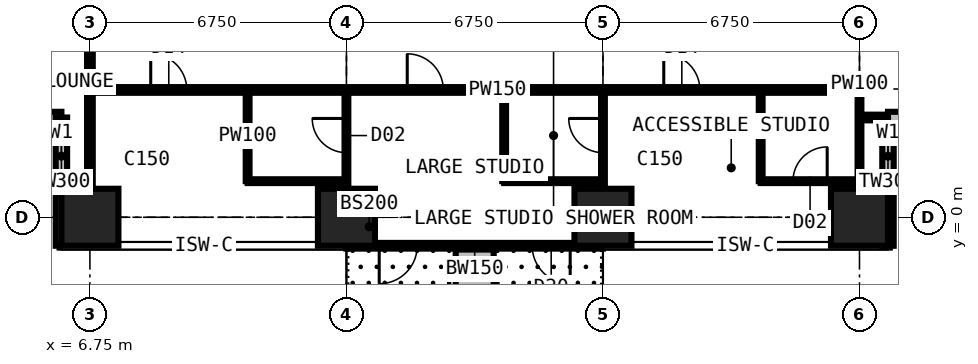
"""IFC4 building model, lengths in metres.
Left out: names, types, materials, properties, quantities, classifications, styles, units other than length and angle.
Written with IfcOpenShell. Run it as: python <this file> out.ifc"""

import sys

from ifc_helpers import new_model, si_unit, direction, frame, frame_2d, origin, origin_2d, place, context, subcontext, project, spatial, rectangle, extrude, element, fill, save


model = new_model("IFC4")
c1 = context("Model", 3, precision=1e-05, world=origin(), true_north=direction((0.0, 1.0)))
c2 = subcontext(c1, "Body", "Model", "MODEL_VIEW")
j1 = project(units=[si_unit("LENGTHUNIT", "METRE"), si_unit("PLANEANGLEUNIT", "RADIAN")], contexts=[c1])
p1 = place(None, origin())
s1 = spatial("IfcSite", under=j1, at=p1, CompositionType="ELEMENT")
p2 = place(p1, origin())
s2 = spatial("IfcBuilding", under=s1, at=p2, CompositionType="ELEMENT")
p3 = place(p2, frame((0.0, 0.0, 156.6)))
s3 = spatial("IfcBuildingStorey", under=s2, at=p3, CompositionType="ELEMENT", Elevation=156.6)
for number, where, z_axis, x_axis in (
    (1, (6.75, 0.0, 0.0), (0.0, 0.0, 1.0), (1.0, 0.0, 0.0)),
    (2, (13.5, 0.0, 0.0), (0.0, 0.0, 1.0), (1.0, 0.0, 0.0)),
    (3, (20.25, 0.0, 0.0), (0.0, 0.0, 1.0), (1.0, 0.0, 0.0)),
    (4, (27.0, 0.0, 0.0), (0.0, 0.0, 1.0), (1.0, 0.0, 0.0)),
):
    element("IfcColumn", number, at=place(p3, frame(where, z_axis=z_axis, x_axis=x_axis)), inside=s3, PredefinedType="COLUMN", context=c2, shape_type="SweptSolid", body=[
        extrude(rectangle(XDim=1.5, YDim=1.5, at=origin_2d()), origin(), (0.0, 0.0, 1.0), 3.6),
    ])
p4 = place(p3, frame((2.625, 2.625, 0.0), z_axis=(0.0, 0.0, 1.0), x_axis=(1.0, 0.0, 0.0)))
e5 = element("IfcWall", 5, at=p4, inside=s3, PredefinedType="SOLIDWALL", context=c2, shape_type="SweptSolid", body=[
    extrude(rectangle(XDim=3.375, YDim=0.3, at=frame_2d((1.688, 0.0))), origin(), (0.0, 0.0, 1.0), 3.375),
])
p5 = place(p4, frame((0.788, 0.0, 0.6)))
e6 = element("IfcOpeningElement", 6, at=p5, cuts=e5, PredefinedType="OPENING", context=c2, shape_type="SweptSolid", body=[
    extrude(rectangle(XDim=1.8, YDim=2.1, at=frame_2d((0.9, 1.05))), frame((0.0, 0.16, 0.0), z_axis=(0.0, -1.0, 0.0), x_axis=(1.0, 0.0, 0.0)), (0.0, 0.0, 1.0), 0.32),
])
p6 = place(p3, frame((6.0, 2.625, 0.0), z_axis=(0.0, 0.0, 1.0), x_axis=(0.0, -1.0, 0.0)))
e7 = element("IfcWall", 7, at=p6, inside=s3, PredefinedType="SOLIDWALL", context=c2, shape_type="SweptSolid", body=[
    extrude(rectangle(XDim=3.375, YDim=0.3, at=frame_2d((1.688, 0.0))), origin(), (0.0, 0.0, 1.0), 3.375),
])
p7 = place(p6, frame((0.268, 0.0, 0.9)))
e8 = element("IfcOpeningElement", 8, at=p7, cuts=e7, PredefinedType="OPENING", context=c2, shape_type="SweptSolid", body=[
    extrude(rectangle(XDim=1.5, YDim=1.8, at=frame_2d((0.75, 0.9))), frame((0.0, 0.16, 0.0), z_axis=(0.0, -1.0, 0.0), x_axis=(1.0, 0.0, 0.0)), (0.0, 0.0, 1.0), 0.32),
])
p8 = place(p3, frame((20.25, -0.75, 0.0), z_axis=(0.0, 0.0, 1.0), x_axis=(-1.0, 0.0, 0.0)))
e9 = element("IfcWall", 9, at=p8, inside=s3, PredefinedType="SOLIDWALL", context=c2, shape_type="SweptSolid", body=[
    extrude(rectangle(XDim=6.75, YDim=0.15, at=frame_2d((3.375, 0.0))), origin(), (0.0, 0.0, 1.0), 3.375),
])
p9 = place(p8, frame((0.863, 0.0, 0.0)))
e10 = element("IfcOpeningElement", 10, at=p9, cuts=e9, PredefinedType="OPENING", context=c2, shape_type="SweptSolid", body=[
    extrude(rectangle(XDim=1.0, YDim=2.2, at=frame_2d((0.5, 1.1))), frame((0.0, 0.085, 0.0), z_axis=(0.0, -1.0, 0.0), x_axis=(1.0, 0.0, 0.0)), (0.0, 0.0, 1.0), 0.17),
])
p10 = place(p8, frame((1.975, 0.0, 0.9)))
e11 = element("IfcOpeningElement", 11, at=p10, cuts=e9, PredefinedType="OPENING", context=c2, shape_type="SweptSolid", body=[
    extrude(rectangle(XDim=1.2, YDim=1.8, at=frame_2d((0.6, 0.9))), frame((0.0, 0.085, 0.0), z_axis=(0.0, -1.0, 0.0), x_axis=(1.0, 0.0, 0.0)), (0.0, 0.0, 1.0), 0.17),
])
p11 = place(p8, frame((4.887, 0.0, 0.0)))
e12 = element("IfcOpeningElement", 12, at=p11, cuts=e9, PredefinedType="OPENING", context=c2, shape_type="SweptSolid", body=[
    extrude(rectangle(XDim=1.0, YDim=2.2, at=frame_2d((0.5, 1.1))), frame((0.0, 0.085, 0.0), z_axis=(0.0, -1.0, 0.0), x_axis=(1.0, 0.0, 0.0)), (0.0, 0.0, 1.0), 0.17),
])
p12 = place(p8, frame((3.575, 0.0, 0.9)))
e13 = element("IfcOpeningElement", 13, at=p12, cuts=e9, PredefinedType="OPENING", context=c2, shape_type="SweptSolid", body=[
    extrude(rectangle(XDim=1.2, YDim=1.8, at=frame_2d((0.6, 0.9))), frame((0.0, 0.085, 0.0), z_axis=(0.0, -1.0, 0.0), x_axis=(1.0, 0.0, 0.0)), (0.0, 0.0, 1.0), 0.17),
])
p13 = place(p3, frame((27.75, -0.75, 0.0), z_axis=(0.0, 0.0, 1.0), x_axis=(0.0, 1.0, 0.0)))
e14 = element("IfcWall", 14, at=p13, inside=s3, PredefinedType="SOLIDWALL", context=c2, shape_type="SweptSolid", body=[
    extrude(rectangle(XDim=3.375, YDim=0.3, at=frame_2d((1.688, 0.0))), origin(), (0.0, 0.0, 1.0), 3.375),
])
p14 = place(p13, frame((1.607, 0.0, 0.9)))
e15 = element("IfcOpeningElement", 15, at=p14, cuts=e14, PredefinedType="OPENING", context=c2, shape_type="SweptSolid", body=[
    extrude(rectangle(XDim=1.5, YDim=1.8, at=frame_2d((0.75, 0.9))), frame((0.0, 0.16, 0.0), z_axis=(0.0, -1.0, 0.0), x_axis=(1.0, 0.0, 0.0)), (0.0, 0.0, 1.0), 0.32),
])
p15 = place(p3, frame((27.75, 2.625, 0.0), z_axis=(0.0, 0.0, 1.0), x_axis=(1.0, 0.0, 0.0)))
e16 = element("IfcWall", 16, at=p15, inside=s3, PredefinedType="SOLIDWALL", context=c2, shape_type="SweptSolid", body=[
    extrude(rectangle(XDim=3.375, YDim=0.3, at=frame_2d((1.688, 0.0))), origin(), (0.0, 0.0, 1.0), 3.375),
])
p16 = place(p15, frame((0.788, 0.0, 0.6)))
e17 = element("IfcOpeningElement", 17, at=p16, cuts=e16, PredefinedType="OPENING", context=c2, shape_type="SweptSolid", body=[
    extrude(rectangle(XDim=1.8, YDim=2.1, at=frame_2d((0.9, 1.05))), frame((0.0, 0.16, 0.0), z_axis=(0.0, -1.0, 0.0), x_axis=(1.0, 0.0, 0.0)), (0.0, 0.0, 1.0), 0.32),
])
p17 = place(p3, frame((16.875, -0.85, 0.0), z_axis=(0.0, 0.0, 1.0), x_axis=(0.0, -1.0, 0.0)))
e18 = element("IfcWall", 18, at=p17, inside=s3, PredefinedType="USERDEFINED", context=c2, shape_type="SweptSolid", body=[
    extrude(rectangle(XDim=2.2, YDim=1.0, at=frame_2d((1.1, 0.0))), origin(), (0.0, 0.0, 1.0), 0.9),
])
p18 = place(p3, frame((6.75, -0.734, 0.0), z_axis=(0.0, 0.0, 1.0), x_axis=(0.0, 1.0, 0.0)))
e19 = element("IfcWall", 19, at=p18, inside=s3, PredefinedType="PARTITIONING", context=c2, shape_type="SweptSolid", body=[
    extrude(rectangle(XDim=10.859, YDim=0.15, at=frame_2d((5.429, 0.0))), origin(), (0.0, 0.0, 1.0), 2.877),
])
p19 = place(p18, frame((5.684, 0.0, 0.0)))
e20 = element("IfcOpeningElement", 20, at=p19, cuts=e19, PredefinedType="OPENING", context=c2, shape_type="SweptSolid", body=[
    extrude(rectangle(XDim=1.0, YDim=2.2, at=frame_2d((0.5, 1.1))), frame((0.0, 0.085, 0.0), z_axis=(0.0, -1.0, 0.0), x_axis=(1.0, 0.0, 0.0)), (0.0, 0.0, 1.0), 0.17),
])
p20 = place(p3, frame((6.75, 3.35, 0.0), z_axis=(0.0, 0.0, 1.0), x_axis=(1.0, 0.0, 0.0)))
e21 = element("IfcWall", 21, at=p20, inside=s3, PredefinedType="PARTITIONING", context=c2, shape_type="SweptSolid", body=[
    extrude(rectangle(XDim=20.25, YDim=0.15, at=frame_2d((10.125, 0.0))), origin(), (0.0, 0.0, 1.0), 3.375),
])
p21 = place(p20, frame((15.1, 0.0, 0.0)))
e22 = element("IfcOpeningElement", 22, at=p21, cuts=e21, PredefinedType="OPENING", context=c2, shape_type="SweptSolid", body=[
    extrude(rectangle(XDim=0.95, YDim=2.2, at=frame_2d((0.475, 1.1))), frame((0.0, 0.085, 0.0), z_axis=(0.0, -1.0, 0.0), x_axis=(1.0, 0.0, 0.0)), (0.0, 0.0, 1.0), 0.17),
])
p22 = place(p20, frame((8.35, 0.0, 0.0)))
e23 = element("IfcOpeningElement", 23, at=p22, cuts=e21, PredefinedType="OPENING", context=c2, shape_type="SweptSolid", body=[
    extrude(rectangle(XDim=0.95, YDim=2.2, at=frame_2d((0.475, 1.1))), frame((0.0, 0.085, 0.0), z_axis=(0.0, -1.0, 0.0), x_axis=(1.0, 0.0, 0.0)), (0.0, 0.0, 1.0), 0.17),
])
p23 = place(p20, frame((1.6, 0.0, 0.0)))
e24 = element("IfcOpeningElement", 24, at=p23, cuts=e21, PredefinedType="OPENING", context=c2, shape_type="SweptSolid", body=[
    extrude(rectangle(XDim=0.95, YDim=2.2, at=frame_2d((0.475, 1.1))), frame((0.0, 0.085, 0.0), z_axis=(0.0, -1.0, 0.0), x_axis=(1.0, 0.0, 0.0)), (0.0, 0.0, 1.0), 0.17),
])
p24 = place(p3, frame((10.9, 0.95, 0.0), z_axis=(0.0, 0.0, 1.0), x_axis=(0.0, 1.0, 0.0)))
e25 = element("IfcWall", 25, at=p24, inside=s3, PredefinedType="PARTITIONING", context=c2, shape_type="SweptSolid", body=[
    extrude(rectangle(XDim=2.4, YDim=0.1, at=frame_2d((1.2, 0.0))), origin(), (0.0, 0.0, 1.0), 3.375),
])
p25 = place(p3, frame((10.9, 0.95, 0.0), z_axis=(0.0, 0.0, 1.0), x_axis=(1.0, 0.0, 0.0)))
e26 = element("IfcWall", 26, at=p25, inside=s3, PredefinedType="PARTITIONING", context=c2, shape_type="SweptSolid", body=[
    extrude(rectangle(XDim=2.6, YDim=0.1, at=frame_2d((1.3, 0.0))), origin(), (0.0, 0.0, 1.0), 3.375),
])
p26 = place(p3, frame((13.5, -0.734, 0.0), z_axis=(0.0, 0.0, 1.0), x_axis=(0.0, 1.0, 0.0)))
e27 = element("IfcWall", 27, at=p26, inside=s3, PredefinedType="PARTITIONING", context=c2, shape_type="SweptSolid", body=[
    extrude(rectangle(XDim=4.084, YDim=0.1, at=frame_2d((2.042, 0.0))), origin(), (0.0, 0.0, 1.0), 2.877),
])
p27 = place(p26, frame((2.434, 0.0, 0.0)))
e28 = element("IfcOpeningElement", 28, at=p27, cuts=e27, PredefinedType="OPENING", context=c2, shape_type="SweptSolid", body=[
    extrude(rectangle(XDim=0.9, YDim=2.2, at=frame_2d((0.45, 1.1))), frame((0.0, 0.06, 0.0), z_axis=(0.0, -1.0, 0.0), x_axis=(1.0, 0.0, 0.0)), (0.0, 0.0, 1.0), 0.12),
])
p28 = place(p3, frame((17.65, 0.95, 0.0), z_axis=(0.0, 0.0, 1.0), x_axis=(0.0, 1.0, 0.0)))
e29 = element("IfcWall", 29, at=p28, inside=s3, PredefinedType="PARTITIONING", context=c2, shape_type="SweptSolid", body=[
    extrude(rectangle(XDim=2.4, YDim=0.1, at=frame_2d((1.2, 0.0))), origin(), (0.0, 0.0, 1.0), 3.375),
])
p29 = place(p3, frame((17.65, 0.95, 0.0), z_axis=(0.0, 0.0, 1.0), x_axis=(1.0, 0.0, 0.0)))
e30 = element("IfcWall", 30, at=p29, inside=s3, PredefinedType="PARTITIONING", context=c2, shape_type="SweptSolid", body=[
    extrude(rectangle(XDim=2.6, YDim=0.1, at=frame_2d((1.3, 0.0))), origin(), (0.0, 0.0, 1.0), 3.375),
])
p30 = place(p3, frame((20.25, -0.734, 0.0), z_axis=(0.0, 0.0, 1.0), x_axis=(0.0, 1.0, 0.0)))
e31 = element("IfcWall", 31, at=p30, inside=s3, PredefinedType="PARTITIONING", context=c2, shape_type="SweptSolid", body=[
    extrude(rectangle(XDim=4.084, YDim=0.1, at=frame_2d((2.042, 0.0))), origin(), (0.0, 0.0, 1.0), 2.877),
])
p31 = place(p30, frame((2.434, 0.0, 0.0)))
e32 = element("IfcOpeningElement", 32, at=p31, cuts=e31, PredefinedType="OPENING", context=c2, shape_type="SweptSolid", body=[
    extrude(rectangle(XDim=0.9, YDim=2.2, at=frame_2d((0.45, 1.1))), frame((0.0, 0.06, 0.0), z_axis=(0.0, -1.0, 0.0), x_axis=(1.0, 0.0, 0.0)), (0.0, 0.0, 1.0), 0.12),
])
p32 = place(p3, frame((24.4, 0.95, 0.0), z_axis=(0.0, 0.0, 1.0), x_axis=(0.0, 1.0, 0.0)))
e33 = element("IfcWall", 33, at=p32, inside=s3, PredefinedType="PARTITIONING", context=c2, shape_type="SweptSolid", body=[
    extrude(rectangle(XDim=2.4, YDim=0.1, at=frame_2d((1.2, 0.0))), origin(), (0.0, 0.0, 1.0), 3.375),
])
p33 = place(p3, frame((24.4, 0.95, 0.0), z_axis=(0.0, 0.0, 1.0), x_axis=(1.0, 0.0, 0.0)))
e34 = element("IfcWall", 34, at=p33, inside=s3, PredefinedType="PARTITIONING", context=c2, shape_type="SweptSolid", body=[
    extrude(rectangle(XDim=2.6, YDim=0.1, at=frame_2d((1.3, 0.0))), origin(), (0.0, 0.0, 1.0), 3.375),
])
p34 = place(p33, frame((0.85, 0.0, 0.0)))
e35 = element("IfcOpeningElement", 35, at=p34, cuts=e34, PredefinedType="OPENING", context=c2, shape_type="SweptSolid", body=[
    extrude(rectangle(XDim=0.9, YDim=2.2, at=frame_2d((0.45, 1.1))), frame((0.0, 0.06, 0.0), z_axis=(0.0, -1.0, 0.0), x_axis=(1.0, 0.0, 0.0)), (0.0, 0.0, 1.0), 0.12),
])
p35 = place(p3, frame((27.0, -0.734, 0.0), z_axis=(0.0, 0.0, 1.0), x_axis=(0.0, 1.0, 0.0)))
e36 = element("IfcWall", 36, at=p35, inside=s3, PredefinedType="PARTITIONING", context=c2, shape_type="SweptSolid", body=[
    extrude(rectangle(XDim=4.084, YDim=0.1, at=frame_2d((2.042, 0.0))), origin(), (0.0, 0.0, 1.0), 2.877),
])
p36 = place(p3, frame((27.0, 2.625, 0.0), z_axis=(0.0, 0.0, 1.0), x_axis=(1.0, 0.0, 0.0)))
e37 = element("IfcWall", 37, at=p36, inside=s3, PredefinedType="PARTITIONING", context=c2, shape_type="SweptSolid", body=[
    extrude(rectangle(XDim=0.734, YDim=0.15, at=frame_2d((0.367, 0.0))), origin(), (0.0, 0.0, 1.0), 3.375),
])
p37 = place(p7, origin())
e38 = element("IfcWindow", 38, at=p37, inside=s3, PartitioningType="SINGLE_PANEL", PredefinedType="WINDOW", context=c2, shape_type="SweptSolid", body=[
    extrude(rectangle(XDim=1.5, YDim=1.8, at=frame_2d((0.75, 0.9))), frame((0.0, 0.03, 0.0), z_axis=(0.0, -1.0, 0.0), x_axis=(1.0, 0.0, 0.0)), (0.0, 0.0, 1.0), 0.06),
])
fill(e8, e38)
p38 = place(p9, origin())
e39 = element("IfcDoor", 39, at=p38, inside=s3, OperationType="SINGLE_SWING_LEFT", PredefinedType="DOOR", context=c2, shape_type="SweptSolid", body=[
    extrude(rectangle(XDim=1.0, YDim=2.2, at=frame_2d((0.5, 1.1))), frame((0.0, 0.025, 0.0), z_axis=(0.0, -1.0, 0.0), x_axis=(1.0, 0.0, 0.0)), (0.0, 0.0, 1.0), 0.05),
])
fill(e10, e39)
p39 = place(p10, origin())
e40 = element("IfcWindow", 40, at=p39, inside=s3, PartitioningType="SINGLE_PANEL", PredefinedType="WINDOW", context=c2, shape_type="SweptSolid", body=[
    extrude(rectangle(XDim=1.2, YDim=1.8, at=frame_2d((0.6, 0.9))), frame((0.0, 0.03, 0.0), z_axis=(0.0, -1.0, 0.0), x_axis=(1.0, 0.0, 0.0)), (0.0, 0.0, 1.0), 0.06),
])
fill(e11, e40)
p40 = place(p11, origin())
e41 = element("IfcDoor", 41, at=p40, inside=s3, OperationType="SINGLE_SWING_RIGHT", PredefinedType="DOOR", context=c2, shape_type="SweptSolid", body=[
    extrude(rectangle(XDim=1.0, YDim=2.2, at=frame_2d((0.5, 1.1))), frame((0.0, 0.025, 0.0), z_axis=(0.0, -1.0, 0.0), x_axis=(1.0, 0.0, 0.0)), (0.0, 0.0, 1.0), 0.05),
])
fill(e12, e41)
p41 = place(p12, origin())
e42 = element("IfcWindow", 42, at=p41, inside=s3, PartitioningType="SINGLE_PANEL", PredefinedType="WINDOW", context=c2, shape_type="SweptSolid", body=[
    extrude(rectangle(XDim=1.2, YDim=1.8, at=frame_2d((0.6, 0.9))), frame((0.0, 0.03, 0.0), z_axis=(0.0, -1.0, 0.0), x_axis=(1.0, 0.0, 0.0)), (0.0, 0.0, 1.0), 0.06),
])
fill(e13, e42)
p42 = place(p14, origin())
e43 = element("IfcWindow", 43, at=p42, inside=s3, PartitioningType="SINGLE_PANEL", PredefinedType="WINDOW", context=c2, shape_type="SweptSolid", body=[
    extrude(rectangle(XDim=1.5, YDim=1.8, at=frame_2d((0.75, 0.9))), frame((0.0, 0.03, 0.0), z_axis=(0.0, -1.0, 0.0), x_axis=(1.0, 0.0, 0.0)), (0.0, 0.0, 1.0), 0.06),
])
fill(e15, e43)
p43 = place(p21, origin())
e44 = element("IfcDoor", 44, at=p43, inside=s3, OperationType="SINGLE_SWING_LEFT", PredefinedType="DOOR", context=c2, shape_type="SweptSolid", body=[
    extrude(rectangle(XDim=0.95, YDim=2.2, at=frame_2d((0.475, 1.1))), frame((0.0, 0.025, 0.0), z_axis=(0.0, -1.0, 0.0), x_axis=(1.0, 0.0, 0.0)), (0.0, 0.0, 1.0), 0.05),
])
fill(e22, e44)
p44 = place(p34, origin())
e45 = element("IfcDoor", 45, at=p44, inside=s3, OperationType="SINGLE_SWING_RIGHT", PredefinedType="DOOR", context=c2, shape_type="SweptSolid", body=[
    extrude(rectangle(XDim=0.9, YDim=2.2, at=frame_2d((0.45, 1.1))), frame((0.0, 0.025, 0.0), z_axis=(0.0, -1.0, 0.0), x_axis=(1.0, 0.0, 0.0)), (0.0, 0.0, 1.0), 0.05),
])
fill(e35, e45)
p45 = place(p22, origin())
e46 = element("IfcDoor", 46, at=p45, inside=s3, OperationType="SINGLE_SWING_LEFT", PredefinedType="DOOR", context=c2, shape_type="SweptSolid", body=[
    extrude(rectangle(XDim=0.95, YDim=2.2, at=frame_2d((0.475, 1.1))), frame((0.0, 0.025, 0.0), z_axis=(0.0, -1.0, 0.0), x_axis=(1.0, 0.0, 0.0)), (0.0, 0.0, 1.0), 0.05),
])
fill(e23, e46)
p46 = place(p31, origin())
e47 = element("IfcDoor", 47, at=p46, inside=s3, OperationType="SINGLE_SWING_RIGHT", PredefinedType="DOOR", context=c2, shape_type="SweptSolid", body=[
    extrude(rectangle(XDim=0.9, YDim=2.2, at=frame_2d((0.45, 1.1))), frame((0.0, 0.025, 0.0), z_axis=(0.0, -1.0, 0.0), x_axis=(1.0, 0.0, 0.0)), (0.0, 0.0, 1.0), 0.05),
])
fill(e32, e47)
p47 = place(p23, origin())
e48 = element("IfcDoor", 48, at=p47, inside=s3, OperationType="SINGLE_SWING_LEFT", PredefinedType="DOOR", context=c2, shape_type="SweptSolid", body=[
    extrude(rectangle(XDim=0.95, YDim=2.2, at=frame_2d((0.475, 1.1))), frame((0.0, 0.025, 0.0), z_axis=(0.0, -1.0, 0.0), x_axis=(1.0, 0.0, 0.0)), (0.0, 0.0, 1.0), 0.05),
])
fill(e24, e48)
p48 = place(p27, origin())
e49 = element("IfcDoor", 49, at=p48, inside=s3, OperationType="SINGLE_SWING_RIGHT", PredefinedType="DOOR", context=c2, shape_type="SweptSolid", body=[
    extrude(rectangle(XDim=0.9, YDim=2.2, at=frame_2d((0.45, 1.1))), frame((0.0, 0.025, 0.0), z_axis=(0.0, -1.0, 0.0), x_axis=(1.0, 0.0, 0.0)), (0.0, 0.0, 1.0), 0.05),
])
fill(e28, e49)
save(model, sys.argv[1])
